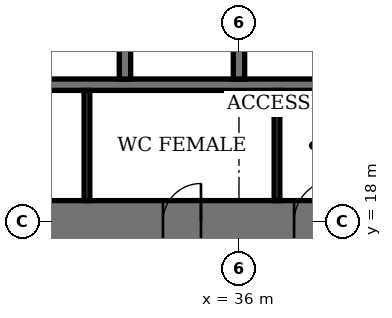
"""IFC4 building model, lengths in metres.
Left out: names, types, materials, properties, quantities, classifications, styles, units other than length and angle.
Written with IfcOpenShell. Run it as: python <this file> out.ifc"""

import sys

from ifc_helpers import new_model, si_unit, direction, frame, frame_2d, origin, place, context, subcontext, project, spatial, rectangle, extrude, element, fill, save


model = new_model("IFC4")
c1 = context("Model", 3, precision=1e-05, world=origin(), true_north=direction((0.0, 1.0)))
c2 = subcontext(c1, "Body", "Model", "MODEL_VIEW")
j1 = project(units=[si_unit("LENGTHUNIT", "METRE"), si_unit("PLANEANGLEUNIT", "RADIAN")], contexts=[c1])
p1 = place(None, origin())
s1 = spatial("IfcSite", under=j1, at=p1, CompositionType="ELEMENT")
p2 = place(p1, origin())
s2 = spatial("IfcBuilding", under=s1, at=p2, CompositionType="ELEMENT")
p3 = place(p2, frame((0.0, 0.0, 55.8)))
s3 = spatial("IfcBuildingStorey", under=s2, at=p3, CompositionType="ELEMENT", Elevation=55.8)
p4 = place(p3, frame((17.45, 18.0, 0.0), z_axis=(0.0, 0.0, 1.0), x_axis=(1.0, 0.0, 0.0)))
e1 = element("IfcWall", 1, at=p4, inside=s3, PredefinedType="SHEAR", context=c2, shape_type="SweptSolid", body=[
    extrude(rectangle(XDim=28.1, YDim=1.1, at=frame_2d((14.05, 0.0))), origin(), (0.0, 0.0, 1.0), 4.0),
])
p5 = place(p4, frame((11.55, 0.0, 0.0)))
e2 = element("IfcOpeningElement", 2, at=p5, cuts=e1, PredefinedType="OPENING", context=c2, shape_type="SweptSolid", body=[
    extrude(rectangle(XDim=1.0, YDim=2.4, at=frame_2d((0.5, 1.2))), frame((0.0, 0.56, 0.0), z_axis=(0.0, -1.0, 0.0), x_axis=(1.0, 0.0, 0.0)), (0.0, 0.0, 1.0), 1.12),
])
p6 = place(p4, frame((16.55, 0.0, 0.0)))
e3 = element("IfcOpeningElement", 3, at=p6, cuts=e1, PredefinedType="OPENING", context=c2, shape_type="SweptSolid", body=[
    extrude(rectangle(XDim=1.0, YDim=2.4, at=frame_2d((0.5, 1.2))), frame((0.0, 0.56, 0.0), z_axis=(0.0, -1.0, 0.0), x_axis=(1.0, 0.0, 0.0)), (0.0, 0.0, 1.0), 1.12),
])
p7 = place(p4, frame((20.0, 0.0, 0.0)))
e4 = element("IfcOpeningElement", 4, at=p7, cuts=e1, PredefinedType="OPENING", context=c2, shape_type="SweptSolid", body=[
    extrude(rectangle(XDim=1.1, YDim=2.4, at=frame_2d((0.55, 1.2))), frame((0.0, 0.56, 0.0), z_axis=(0.0, -1.0, 0.0), x_axis=(1.0, 0.0, 0.0)), (0.0, 0.0, 1.0), 1.12),
])
p8 = place(p4, frame((24.05, 0.0, 0.0)))
e5 = element("IfcOpeningElement", 5, at=p8, cuts=e1, PredefinedType="OPENING", context=c2, shape_type="SweptSolid", body=[
    extrude(rectangle(XDim=1.0, YDim=2.4, at=frame_2d((0.5, 1.2))), frame((0.0, 0.56, 0.0), z_axis=(0.0, -1.0, 0.0), x_axis=(1.0, 0.0, 0.0)), (0.0, 0.0, 1.0), 1.12),
])
p9 = place(p3, frame((27.15, 21.6, 0.0), z_axis=(0.0, 0.0, 1.0), x_axis=(1.0, 0.0, 0.0)))
e6 = element("IfcWall", 6, at=p9, inside=s3, PredefinedType="SHEAR", context=c2, shape_type="SweptSolid", body=[
    extrude(rectangle(XDim=17.3, YDim=0.3, at=frame_2d((8.65, 0.0))), origin(), (0.0, 0.0, 1.0), 4.0),
])
for number, where, z_axis, x_axis in (
    (7, (33.0, 21.75, 0.0), (0.0, 0.0, 1.0), (0.0, 1.0, 0.0)),
    (8, (36.0, 21.75, 0.0), (0.0, 0.0, 1.0), (0.0, 1.0, 0.0)),
):
    element("IfcWall", number, at=place(p3, frame(where, z_axis=z_axis, x_axis=x_axis)), inside=s3, PredefinedType="SHEAR", context=c2, shape_type="SweptSolid", body=[
        extrude(rectangle(XDim=2.7, YDim=0.3, at=frame_2d((1.35, 0.0))), origin(), (0.0, 0.0, 1.0), 4.0),
    ])
for number, where, z_axis, x_axis in (
    (9, (32.0, 18.55, 0.0), (0.0, 0.0, 1.0), (0.0, 1.0, 0.0)),
    (10, (37.0, 18.55, 0.0), (0.0, 0.0, 1.0), (0.0, 1.0, 0.0)),
):
    element("IfcWall", number, at=place(p3, frame(where, z_axis=z_axis, x_axis=x_axis)), inside=s3, PredefinedType="PARTITIONING", context=c2, shape_type="SweptSolid", body=[
        extrude(rectangle(XDim=2.9, YDim=0.15, at=frame_2d((1.45, 0.0))), origin(), (0.0, 0.0, 1.0), 3.75),
    ])
p10 = place(p6, origin())
e11 = element("IfcDoor", 11, at=p10, inside=s3, OperationType="SINGLE_SWING_LEFT", PredefinedType="DOOR", context=c2, shape_type="SweptSolid", body=[
    extrude(rectangle(XDim=1.0, YDim=2.4, at=frame_2d((0.5, 1.2))), frame((0.0, 0.025, 0.0), z_axis=(0.0, -1.0, 0.0), x_axis=(1.0, 0.0, 0.0)), (0.0, 0.0, 1.0), 0.05),
    extrude(rectangle(XDim=0.04, YDim=2.4, at=frame_2d((0.02, 1.2))), frame((0.0, 0.4, 0.0), z_axis=(0.0, -1.0, 0.0), x_axis=(1.0, 0.0, 0.0)), (0.0, 0.0, 1.0), 0.8),
    extrude(rectangle(XDim=0.04, YDim=2.4, at=frame_2d((0.98, 1.2))), frame((0.0, 0.4, 0.0), z_axis=(0.0, -1.0, 0.0), x_axis=(1.0, 0.0, 0.0)), (0.0, 0.0, 1.0), 0.8),
    extrude(rectangle(XDim=1.0, YDim=0.04, at=frame_2d((0.5, 2.38))), frame((0.0, 0.4, 0.0), z_axis=(0.0, -1.0, 0.0), x_axis=(1.0, 0.0, 0.0)), (0.0, 0.0, 1.0), 0.8),
])
fill(e3, e11)
p11 = place(p7, origin())
e12 = element("IfcDoor", 12, at=p11, inside=s3, OperationType="SINGLE_SWING_LEFT", PredefinedType="DOOR", context=c2, shape_type="SweptSolid", body=[
    extrude(rectangle(XDim=1.1, YDim=2.4, at=frame_2d((0.55, 1.2))), frame((0.0, 0.025, 0.0), z_axis=(0.0, -1.0, 0.0), x_axis=(1.0, 0.0, 0.0)), (0.0, 0.0, 1.0), 0.05),
    extrude(rectangle(XDim=0.04, YDim=2.4, at=frame_2d((0.02, 1.2))), frame((0.0, 0.44, 0.0), z_axis=(0.0, -1.0, 0.0), x_axis=(1.0, 0.0, 0.0)), (0.0, 0.0, 1.0), 0.88),
    extrude(rectangle(XDim=0.04, YDim=2.4, at=frame_2d((1.08, 1.2))), frame((0.0, 0.44, 0.0), z_axis=(0.0, -1.0, 0.0), x_axis=(1.0, 0.0, 0.0)), (0.0, 0.0, 1.0), 0.88),
    extrude(rectangle(XDim=1.1, YDim=0.04, at=frame_2d((0.55, 2.38))), frame((0.0, 0.44, 0.0), z_axis=(0.0, -1.0, 0.0), x_axis=(1.0, 0.0, 0.0)), (0.0, 0.0, 1.0), 0.88),
])
fill(e4, e12)
save(model, sys.argv[1])
